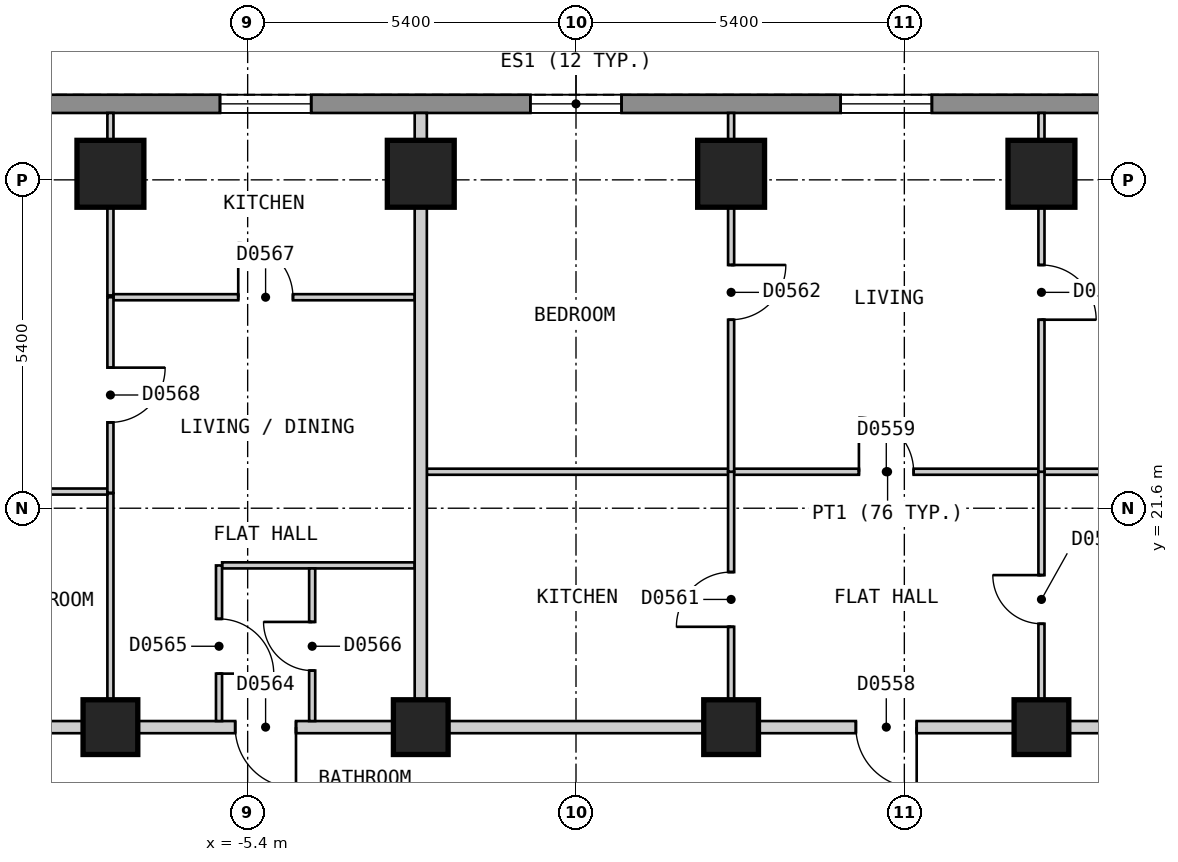
"""IFC4 building model, lengths in metres.
Left out: names, types, materials, properties, quantities, classifications, styles, units other than length and angle.
Written with IfcOpenShell. Run it as: python <this file> out.ifc"""

import sys

from ifc_helpers import new_model, si_unit, direction, frame, frame_2d, origin, origin_2d, place, context, subcontext, project, spatial, polyline, rectangle, outline, extrude, element, fill, save


model = new_model("IFC4")
c1 = context("Model", 3, precision=1e-05, world=origin(), true_north=direction((0.0, 1.0)))
c2 = subcontext(c1, "Body", "Model", "MODEL_VIEW")
j1 = project(units=[si_unit("LENGTHUNIT", "METRE"), si_unit("PLANEANGLEUNIT", "RADIAN")], contexts=[c1])
p1 = place(None, origin())
s1 = spatial("IfcSite", under=j1, at=p1, CompositionType="ELEMENT")
p2 = place(p1, origin())
s2 = spatial("IfcBuilding", under=s1, at=p2, CompositionType="ELEMENT")
p3 = place(p2, frame((0.0, 0.0, 56.4)))
s3 = spatial("IfcBuildingStorey", under=s2, at=p3, CompositionType="ELEMENT", Elevation=56.4)
for number, where, z_axis, x_axis in (
    (1, (7.655, 27.1, 0.0), (0.0, 0.0, 1.0), (-1.0, 0.0, 0.0)),
    (2, (2.551, 27.1, 0.0), (0.0, 0.0, 1.0), (-1.0, 0.0, 0.0)),
    (3, (-2.553, 27.1, 0.0), (0.0, 0.0, 1.0), (-1.0, 0.0, 0.0)),
    (4, (-7.657, 27.1, 0.0), (0.0, 0.0, 1.0), (-1.0, 0.0, 0.0)),
):
    element("IfcColumn", number, at=place(p3, frame(where, z_axis=z_axis, x_axis=x_axis)), inside=s3, PredefinedType="COLUMN", context=c2, shape_type="SweptSolid", body=[
        extrude(rectangle(XDim=1.1, YDim=1.1, at=origin_2d()), origin(), (0.0, 0.0, 1.0), 3.0),
    ])
for number, where, z_axis, x_axis in (
    (5, (7.655, 18.0, 0.0), (0.0, 0.0, 1.0), (-1.0, 0.0, 0.0)),
    (6, (2.551, 18.0, 0.0), (0.0, 0.0, 1.0), (-1.0, 0.0, 0.0)),
    (7, (-2.553, 18.0, 0.0), (0.0, 0.0, 1.0), (-1.0, 0.0, 0.0)),
    (8, (-7.657, 18.0, 0.0), (0.0, 0.0, 1.0), (-1.0, 0.0, 0.0)),
):
    element("IfcColumn", number, at=place(p3, frame(where, z_axis=z_axis, x_axis=x_axis)), inside=s3, PredefinedType="COLUMN", context=c2, shape_type="SweptSolid", body=[
        extrude(rectangle(XDim=0.9, YDim=0.9, at=origin_2d()), origin(), (0.0, 0.0, 1.0), 3.0),
    ])
p4 = place(p3, frame((13.51, 28.25, 0.0), z_axis=(0.0, 0.0, 1.0), x_axis=(-1.0, 0.0, 0.0)))
e9 = element("IfcWall", 9, at=p4, inside=s3, PredefinedType="SOLIDWALL", context=c2, shape_type="SweptSolid", body=[
    extrude(outline(polyline([(0.0, -0.15), (27.02, -0.15), (26.94, 0.15), (0.08, 0.15), (0.0, -0.15)])), origin(), (0.0, 0.0, 1.0), 2.7),
])
p5 = place(p4, frame((2.553, 0.0, 0.15)))
e10 = element("IfcOpeningElement", 10, at=p5, cuts=e9, PredefinedType="OPENING", context=c2, shape_type="SweptSolid", body=[
    extrude(rectangle(XDim=1.5, YDim=2.1, at=frame_2d((0.75, 1.05))), frame((0.0, 0.16, 0.0), z_axis=(0.0, -1.0, 0.0), x_axis=(1.0, 0.0, 0.0)), (0.0, 0.0, 1.0), 0.32),
])
p6 = place(p4, frame((7.657, 0.0, 0.15)))
e11 = element("IfcOpeningElement", 11, at=p6, cuts=e9, PredefinedType="OPENING", context=c2, shape_type="SweptSolid", body=[
    extrude(rectangle(XDim=1.5, YDim=2.1, at=frame_2d((0.75, 1.05))), frame((0.0, 0.16, 0.0), z_axis=(0.0, -1.0, 0.0), x_axis=(1.0, 0.0, 0.0)), (0.0, 0.0, 1.0), 0.32),
])
p7 = place(p4, frame((12.761, 0.0, 0.15)))
e12 = element("IfcOpeningElement", 12, at=p7, cuts=e9, PredefinedType="OPENING", context=c2, shape_type="SweptSolid", body=[
    extrude(rectangle(XDim=1.5, YDim=2.1, at=frame_2d((0.75, 1.05))), frame((0.0, 0.16, 0.0), z_axis=(0.0, -1.0, 0.0), x_axis=(1.0, 0.0, 0.0)), (0.0, 0.0, 1.0), 0.32),
])
p8 = place(p4, frame((17.865, 0.0, 0.15)))
e13 = element("IfcOpeningElement", 13, at=p8, cuts=e9, PredefinedType="OPENING", context=c2, shape_type="SweptSolid", body=[
    extrude(rectangle(XDim=1.5, YDim=2.1, at=frame_2d((0.75, 1.05))), frame((0.0, 0.16, 0.0), z_axis=(0.0, -1.0, 0.0), x_axis=(1.0, 0.0, 0.0)), (0.0, 0.0, 1.0), 0.32),
])
p9 = place(p4, frame((22.969, 0.0, 0.15)))
e14 = element("IfcOpeningElement", 14, at=p9, cuts=e9, PredefinedType="OPENING", context=c2, shape_type="SweptSolid", body=[
    extrude(rectangle(XDim=1.5, YDim=2.1, at=frame_2d((0.75, 1.05))), frame((0.0, 0.16, 0.0), z_axis=(0.0, -1.0, 0.0), x_axis=(1.0, 0.0, 0.0)), (0.0, 0.0, 1.0), 0.32),
])
p10 = place(p3, frame((-10.276, 18.0, 0.0), z_axis=(0.0, 0.0, 1.0), x_axis=(1.0, 0.0, 0.0)))
e15 = element("IfcWall", 15, at=p10, inside=s3, PredefinedType="PARTITIONING", context=c2, shape_type="SweptSolid", body=[
    extrude(rectangle(XDim=20.553, YDim=0.2, at=frame_2d((10.276, 0.0))), origin(), (0.0, 0.0, 1.0), 2.7),
])
p11 = place(p10, frame((14.879, 0.0, 0.0)))
e16 = element("IfcOpeningElement", 16, at=p11, cuts=e15, PredefinedType="OPENING", context=c2, shape_type="SweptSolid", body=[
    extrude(rectangle(XDim=1.0, YDim=2.1, at=frame_2d((0.5, 1.05))), frame((0.0, 0.11, 0.0), z_axis=(0.0, -1.0, 0.0), x_axis=(1.0, 0.0, 0.0)), (0.0, 0.0, 1.0), 0.22),
])
p12 = place(p10, frame((4.671, 0.0, 0.0)))
e17 = element("IfcOpeningElement", 17, at=p12, cuts=e15, PredefinedType="OPENING", context=c2, shape_type="SweptSolid", body=[
    extrude(rectangle(XDim=1.0, YDim=2.1, at=frame_2d((0.5, 1.05))), frame((0.0, 0.11, 0.0), z_axis=(0.0, -1.0, 0.0), x_axis=(1.0, 0.0, 0.0)), (0.0, 0.0, 1.0), 0.22),
])
p13 = place(p3, frame((-7.657, 28.1, 0.0), z_axis=(0.0, 0.0, 1.0), x_axis=(0.0, -1.0, 0.0)))
e18 = element("IfcWall", 18, at=p13, inside=s3, PredefinedType="PARTITIONING", context=c2, shape_type="SweptSolid", body=[
    extrude(rectangle(XDim=3.0, YDim=0.1, at=frame_2d((1.5, 0.0))), origin(), (0.0, 0.0, 1.0), 2.7),
])
p14 = place(p3, frame((-7.657, 21.844, 0.0), z_axis=(0.0, 0.0, 1.0), x_axis=(0.0, -1.0, 0.0)))
e19 = element("IfcWall", 19, at=p14, inside=s3, PredefinedType="PARTITIONING", context=c2, shape_type="SweptSolid", body=[
    extrude(rectangle(XDim=3.744, YDim=0.1, at=frame_2d((1.872, 0.0))), origin(), (0.0, 0.0, 1.0), 2.7),
])
p15 = place(p3, frame((-5.82, 20.66, 0.0), z_axis=(0.0, 0.0, 1.0), x_axis=(1.0, 0.0, 0.0)))
e20 = element("IfcWall", 20, at=p15, inside=s3, PredefinedType="PARTITIONING", context=c2, shape_type="SweptSolid", body=[
    extrude(rectangle(XDim=3.167, YDim=0.1, at=frame_2d((1.583, 0.0))), origin(), (0.0, 0.0, 1.0), 2.7),
])
p16 = place(p3, frame((-12.513, 21.874, 0.0), z_axis=(0.0, 0.0, 1.0), x_axis=(1.0, 0.0, 0.0)))
e21 = element("IfcWall", 21, at=p16, inside=s3, PredefinedType="PARTITIONING", context=c2, shape_type="SweptSolid", body=[
    extrude(rectangle(XDim=4.806, YDim=0.1, at=frame_2d((2.403, 0.0))), origin(), (0.0, 0.0, 1.0), 2.7),
])
p17 = place(p16, frame((1.97, 0.0, 0.0)))
e22 = element("IfcOpeningElement", 22, at=p17, cuts=e21, PredefinedType="OPENING", context=c2, shape_type="SweptSolid", body=[
    extrude(rectangle(XDim=0.8, YDim=2.1, at=frame_2d((0.4, 1.05))), frame((0.0, 0.06, 0.0), z_axis=(0.0, -1.0, 0.0), x_axis=(1.0, 0.0, 0.0)), (0.0, 0.0, 1.0), 0.12),
])
p18 = place(p3, frame((-2.453, 22.2, 0.0), z_axis=(0.0, 0.0, 1.0), x_axis=(1.0, 0.0, 0.0)))
e23 = element("IfcWall", 23, at=p18, inside=s3, PredefinedType="PARTITIONING", context=c2, shape_type="SweptSolid", body=[
    extrude(rectangle(XDim=15.155, YDim=0.1, at=frame_2d((7.577, 0.0))), origin(), (0.0, 0.0, 1.0), 2.7),
])
p19 = place(p18, frame((7.106, 0.0, 0.0)))
e24 = element("IfcOpeningElement", 24, at=p19, cuts=e23, PredefinedType="OPENING", context=c2, shape_type="SweptSolid", body=[
    extrude(rectangle(XDim=0.9, YDim=2.1, at=frame_2d((0.45, 1.05))), frame((0.0, 0.06, 0.0), z_axis=(0.0, -1.0, 0.0), x_axis=(1.0, 0.0, 0.0)), (0.0, 0.0, 1.0), 0.12),
])
p20 = place(p3, frame((-7.607, 25.07, 0.0), z_axis=(0.0, 0.0, 1.0), x_axis=(1.0, 0.0, 0.0)))
e25 = element("IfcWall", 25, at=p20, inside=s3, PredefinedType="PARTITIONING", context=c2, shape_type="SweptSolid", body=[
    extrude(rectangle(XDim=4.954, YDim=0.1, at=frame_2d((2.477, 0.0))), origin(), (0.0, 0.0, 1.0), 2.7),
])
p21 = place(p20, frame((2.052, 0.0, 0.0)))
e26 = element("IfcOpeningElement", 26, at=p21, cuts=e25, PredefinedType="OPENING", context=c2, shape_type="SweptSolid", body=[
    extrude(rectangle(XDim=0.9, YDim=2.1, at=frame_2d((0.45, 1.05))), frame((0.0, 0.06, 0.0), z_axis=(0.0, -1.0, 0.0), x_axis=(1.0, 0.0, 0.0)), (0.0, 0.0, 1.0), 0.12),
])
p22 = place(p3, frame((7.655, 18.1, 0.0), z_axis=(0.0, 0.0, 1.0), x_axis=(0.0, 1.0, 0.0)))
e27 = element("IfcWall", 27, at=p22, inside=s3, PredefinedType="PARTITIONING", context=c2, shape_type="SweptSolid", body=[
    extrude(rectangle(XDim=4.1, YDim=0.1, at=frame_2d((2.05, 0.0))), origin(), (0.0, 0.0, 1.0), 2.7),
])
p23 = place(p22, frame((1.6, 0.0, 0.0)))
e28 = element("IfcOpeningElement", 28, at=p23, cuts=e27, PredefinedType="OPENING", context=c2, shape_type="SweptSolid", body=[
    extrude(rectangle(XDim=0.8, YDim=2.1, at=frame_2d((0.4, 1.05))), frame((0.0, 0.06, 0.0), z_axis=(0.0, -1.0, 0.0), x_axis=(1.0, 0.0, 0.0)), (0.0, 0.0, 1.0), 0.12),
])
p24 = place(p3, frame((2.551, 18.1, 0.0), z_axis=(0.0, 0.0, 1.0), x_axis=(0.0, 1.0, 0.0)))
e29 = element("IfcWall", 29, at=p24, inside=s3, PredefinedType="PARTITIONING", context=c2, shape_type="SweptSolid", body=[
    extrude(rectangle(XDim=4.1, YDim=0.1, at=frame_2d((2.05, 0.0))), origin(), (0.0, 0.0, 1.0), 2.7),
])
p25 = place(p24, frame((1.55, 0.0, 0.0)))
e30 = element("IfcOpeningElement", 30, at=p25, cuts=e29, PredefinedType="OPENING", context=c2, shape_type="SweptSolid", body=[
    extrude(rectangle(XDim=0.9, YDim=2.1, at=frame_2d((0.45, 1.05))), frame((0.0, 0.06, 0.0), z_axis=(0.0, -1.0, 0.0), x_axis=(1.0, 0.0, 0.0)), (0.0, 0.0, 1.0), 0.12),
])
p26 = place(p3, frame((-4.339, 18.1, 0.0), z_axis=(0.0, 0.0, 1.0), x_axis=(0.0, 1.0, 0.0)))
e31 = element("IfcWall", 31, at=p26, inside=s3, PredefinedType="PARTITIONING", context=c2, shape_type="SweptSolid", body=[
    extrude(rectangle(XDim=2.51, YDim=0.1, at=frame_2d((1.255, 0.0))), origin(), (0.0, 0.0, 1.0), 2.7),
])
p27 = place(p26, frame((0.83, 0.0, 0.0)))
e32 = element("IfcOpeningElement", 32, at=p27, cuts=e31, PredefinedType="OPENING", context=c2, shape_type="SweptSolid", body=[
    extrude(rectangle(XDim=0.8, YDim=2.1, at=frame_2d((0.4, 1.05))), frame((0.0, 0.06, 0.0), z_axis=(0.0, -1.0, 0.0), x_axis=(1.0, 0.0, 0.0)), (0.0, 0.0, 1.0), 0.12),
])
p28 = place(p3, frame((-5.871, 18.1, 0.0), z_axis=(0.0, 0.0, 1.0), x_axis=(0.0, 1.0, 0.0)))
e33 = element("IfcWall", 33, at=p28, inside=s3, PredefinedType="PARTITIONING", context=c2, shape_type="SweptSolid", body=[
    extrude(rectangle(XDim=2.559, YDim=0.1, at=frame_2d((1.279, 0.0))), origin(), (0.0, 0.0, 1.0), 2.7),
])
p29 = place(p28, frame((0.78, 0.0, 0.0)))
e34 = element("IfcOpeningElement", 34, at=p29, cuts=e33, PredefinedType="OPENING", context=c2, shape_type="SweptSolid", body=[
    extrude(rectangle(XDim=0.9, YDim=2.1, at=frame_2d((0.45, 1.05))), frame((0.0, 0.06, 0.0), z_axis=(0.0, -1.0, 0.0), x_axis=(1.0, 0.0, 0.0)), (0.0, 0.0, 1.0), 0.12),
])
p30 = place(p3, frame((-7.657, 21.854, 0.0), z_axis=(0.0, 0.0, 1.0), x_axis=(0.0, 1.0, 0.0)))
e35 = element("IfcWall", 35, at=p30, inside=s3, PredefinedType="PARTITIONING", context=c2, shape_type="SweptSolid", body=[
    extrude(rectangle(XDim=3.216, YDim=0.1, at=frame_2d((1.608, 0.0))), origin(), (0.0, 0.0, 1.0), 2.7),
])
p31 = place(p30, frame((1.158, 0.0, 0.0)))
e36 = element("IfcOpeningElement", 36, at=p31, cuts=e35, PredefinedType="OPENING", context=c2, shape_type="SweptSolid", body=[
    extrude(rectangle(XDim=0.9, YDim=2.1, at=frame_2d((0.45, 1.05))), frame((0.0, 0.06, 0.0), z_axis=(0.0, -1.0, 0.0), x_axis=(1.0, 0.0, 0.0)), (0.0, 0.0, 1.0), 0.12),
])
p32 = place(p3, frame((-2.553, 18.1, 0.0), z_axis=(0.0, 0.0, 1.0), x_axis=(0.0, 1.0, 0.0)))
e37 = element("IfcWall", 37, at=p32, inside=s3, PredefinedType="PARTITIONING", context=c2, shape_type="SweptSolid", body=[
    extrude(rectangle(XDim=10.0, YDim=0.2, at=frame_2d((5.0, 0.0))), origin(), (0.0, 0.0, 1.0), 2.7),
])
p33 = place(p3, frame((7.655, 22.2, 0.0), z_axis=(0.0, 0.0, 1.0), x_axis=(0.0, 1.0, 0.0)))
e38 = element("IfcWall", 38, at=p33, inside=s3, PredefinedType="PARTITIONING", context=c2, shape_type="SweptSolid", body=[
    extrude(rectangle(XDim=5.9, YDim=0.1, at=frame_2d((2.95, 0.0))), origin(), (0.0, 0.0, 1.0), 2.7),
])
p34 = place(p33, frame((2.5, 0.0, 0.0)))
e39 = element("IfcOpeningElement", 39, at=p34, cuts=e38, PredefinedType="OPENING", context=c2, shape_type="SweptSolid", body=[
    extrude(rectangle(XDim=0.9, YDim=2.1, at=frame_2d((0.45, 1.05))), frame((0.0, 0.06, 0.0), z_axis=(0.0, -1.0, 0.0), x_axis=(1.0, 0.0, 0.0)), (0.0, 0.0, 1.0), 0.12),
])
p35 = place(p3, frame((2.551, 22.2, 0.0), z_axis=(0.0, 0.0, 1.0), x_axis=(0.0, 1.0, 0.0)))
e40 = element("IfcWall", 40, at=p35, inside=s3, PredefinedType="PARTITIONING", context=c2, shape_type="SweptSolid", body=[
    extrude(rectangle(XDim=5.9, YDim=0.1, at=frame_2d((2.95, 0.0))), origin(), (0.0, 0.0, 1.0), 2.7),
])
p36 = place(p35, frame((2.5, 0.0, 0.0)))
e41 = element("IfcOpeningElement", 41, at=p36, cuts=e40, PredefinedType="OPENING", context=c2, shape_type="SweptSolid", body=[
    extrude(rectangle(XDim=0.9, YDim=2.1, at=frame_2d((0.45, 1.05))), frame((0.0, 0.06, 0.0), z_axis=(0.0, -1.0, 0.0), x_axis=(1.0, 0.0, 0.0)), (0.0, 0.0, 1.0), 0.12),
])
p37 = place(p6, origin())
e42 = element("IfcWindow", 42, at=p37, inside=s3, PartitioningType="SINGLE_PANEL", PredefinedType="WINDOW", context=c2, shape_type="SweptSolid", body=[
    extrude(rectangle(XDim=1.5, YDim=2.1, at=frame_2d((0.75, 1.05))), frame((0.0, 0.03, 0.0), z_axis=(0.0, -1.0, 0.0), x_axis=(1.0, 0.0, 0.0)), (0.0, 0.0, 1.0), 0.06),
])
fill(e11, e42)
p38 = place(p7, origin())
e43 = element("IfcWindow", 43, at=p38, inside=s3, PartitioningType="SINGLE_PANEL", PredefinedType="WINDOW", context=c2, shape_type="SweptSolid", body=[
    extrude(rectangle(XDim=1.5, YDim=2.1, at=frame_2d((0.75, 1.05))), frame((0.0, 0.03, 0.0), z_axis=(0.0, -1.0, 0.0), x_axis=(1.0, 0.0, 0.0)), (0.0, 0.0, 1.0), 0.06),
])
fill(e12, e43)
p39 = place(p8, origin())
e44 = element("IfcWindow", 44, at=p39, inside=s3, PartitioningType="SINGLE_PANEL", PredefinedType="WINDOW", context=c2, shape_type="SweptSolid", body=[
    extrude(rectangle(XDim=1.5, YDim=2.1, at=frame_2d((0.75, 1.05))), frame((0.0, 0.03, 0.0), z_axis=(0.0, -1.0, 0.0), x_axis=(1.0, 0.0, 0.0)), (0.0, 0.0, 1.0), 0.06),
])
fill(e13, e44)
p40 = place(p11, origin())
e45 = element("IfcDoor", 45, at=p40, inside=s3, OperationType="SINGLE_SWING_RIGHT", PredefinedType="DOOR", context=c2, shape_type="SweptSolid", body=[
    extrude(rectangle(XDim=1.0, YDim=2.1, at=frame_2d((0.5, 1.05))), frame((0.0, 0.025, 0.0), z_axis=(0.0, -1.0, 0.0), x_axis=(1.0, 0.0, 0.0)), (0.0, 0.0, 1.0), 0.05),
])
fill(e16, e45)
p41 = place(p19, origin())
e46 = element("IfcDoor", 46, at=p41, inside=s3, OperationType="SINGLE_SWING_LEFT", PredefinedType="DOOR", context=c2, shape_type="SweptSolid", body=[
    extrude(rectangle(XDim=0.9, YDim=2.1, at=frame_2d((0.45, 1.05))), frame((0.0, 0.025, 0.0), z_axis=(0.0, -1.0, 0.0), x_axis=(1.0, 0.0, 0.0)), (0.0, 0.0, 1.0), 0.05),
])
fill(e24, e46)
p42 = place(p23, origin())
e47 = element("IfcDoor", 47, at=p42, inside=s3, OperationType="SINGLE_SWING_RIGHT", PredefinedType="DOOR", context=c2, shape_type="SweptSolid", body=[
    extrude(rectangle(XDim=0.8, YDim=2.1, at=frame_2d((0.4, 1.05))), frame((0.0, 0.025, 0.0), z_axis=(0.0, -1.0, 0.0), x_axis=(1.0, 0.0, 0.0)), (0.0, 0.0, 1.0), 0.05),
])
fill(e28, e47)
p43 = place(p25, origin())
e48 = element("IfcDoor", 48, at=p43, inside=s3, OperationType="SINGLE_SWING_LEFT", PredefinedType="DOOR", context=c2, shape_type="SweptSolid", body=[
    extrude(rectangle(XDim=0.9, YDim=2.1, at=frame_2d((0.45, 1.05))), frame((0.0, 0.025, 0.0), z_axis=(0.0, -1.0, 0.0), x_axis=(1.0, 0.0, 0.0)), (0.0, 0.0, 1.0), 0.05),
])
fill(e30, e48)
p44 = place(p36, origin())
e49 = element("IfcDoor", 49, at=p44, inside=s3, OperationType="SINGLE_SWING_RIGHT", PredefinedType="DOOR", context=c2, shape_type="SweptSolid", body=[
    extrude(rectangle(XDim=0.9, YDim=2.1, at=frame_2d((0.45, 1.05))), frame((0.0, 0.025, 0.0), z_axis=(0.0, -1.0, 0.0), x_axis=(1.0, 0.0, 0.0)), (0.0, 0.0, 1.0), 0.05),
])
fill(e41, e49)
p45 = place(p34, origin())
e50 = element("IfcDoor", 50, at=p45, inside=s3, OperationType="SINGLE_SWING_LEFT", PredefinedType="DOOR", context=c2, shape_type="SweptSolid", body=[
    extrude(rectangle(XDim=0.9, YDim=2.1, at=frame_2d((0.45, 1.05))), frame((0.0, 0.025, 0.0), z_axis=(0.0, -1.0, 0.0), x_axis=(1.0, 0.0, 0.0)), (0.0, 0.0, 1.0), 0.05),
])
fill(e39, e50)
p46 = place(p12, origin())
e51 = element("IfcDoor", 51, at=p46, inside=s3, OperationType="SINGLE_SWING_RIGHT", PredefinedType="DOOR", context=c2, shape_type="SweptSolid", body=[
    extrude(rectangle(XDim=1.0, YDim=2.1, at=frame_2d((0.5, 1.05))), frame((0.0, 0.025, 0.0), z_axis=(0.0, -1.0, 0.0), x_axis=(1.0, 0.0, 0.0)), (0.0, 0.0, 1.0), 0.05),
])
fill(e17, e51)
p47 = place(p29, origin())
e52 = element("IfcDoor", 52, at=p47, inside=s3, OperationType="SINGLE_SWING_LEFT", PredefinedType="DOOR", context=c2, shape_type="SweptSolid", body=[
    extrude(rectangle(XDim=0.9, YDim=2.1, at=frame_2d((0.45, 1.05))), frame((0.0, 0.025, 0.0), z_axis=(0.0, -1.0, 0.0), x_axis=(1.0, 0.0, 0.0)), (0.0, 0.0, 1.0), 0.05),
])
fill(e34, e52)
p48 = place(p27, origin())
e53 = element("IfcDoor", 53, at=p48, inside=s3, OperationType="SINGLE_SWING_RIGHT", PredefinedType="DOOR", context=c2, shape_type="SweptSolid", body=[
    extrude(rectangle(XDim=0.8, YDim=2.1, at=frame_2d((0.4, 1.05))), frame((0.0, 0.025, 0.0), z_axis=(0.0, -1.0, 0.0), x_axis=(1.0, 0.0, 0.0)), (0.0, 0.0, 1.0), 0.05),
])
fill(e32, e53)
p49 = place(p21, origin())
e54 = element("IfcDoor", 54, at=p49, inside=s3, OperationType="SINGLE_SWING_LEFT", PredefinedType="DOOR", context=c2, shape_type="SweptSolid", body=[
    extrude(rectangle(XDim=0.9, YDim=2.1, at=frame_2d((0.45, 1.05))), frame((0.0, 0.025, 0.0), z_axis=(0.0, -1.0, 0.0), x_axis=(1.0, 0.0, 0.0)), (0.0, 0.0, 1.0), 0.05),
])
fill(e26, e54)
p50 = place(p31, origin())
e55 = element("IfcDoor", 55, at=p50, inside=s3, OperationType="SINGLE_SWING_RIGHT", PredefinedType="DOOR", context=c2, shape_type="SweptSolid", body=[
    extrude(rectangle(XDim=0.9, YDim=2.1, at=frame_2d((0.45, 1.05))), frame((0.0, 0.025, 0.0), z_axis=(0.0, -1.0, 0.0), x_axis=(1.0, 0.0, 0.0)), (0.0, 0.0, 1.0), 0.05),
])
fill(e36, e55)
save(model, sys.argv[1])
